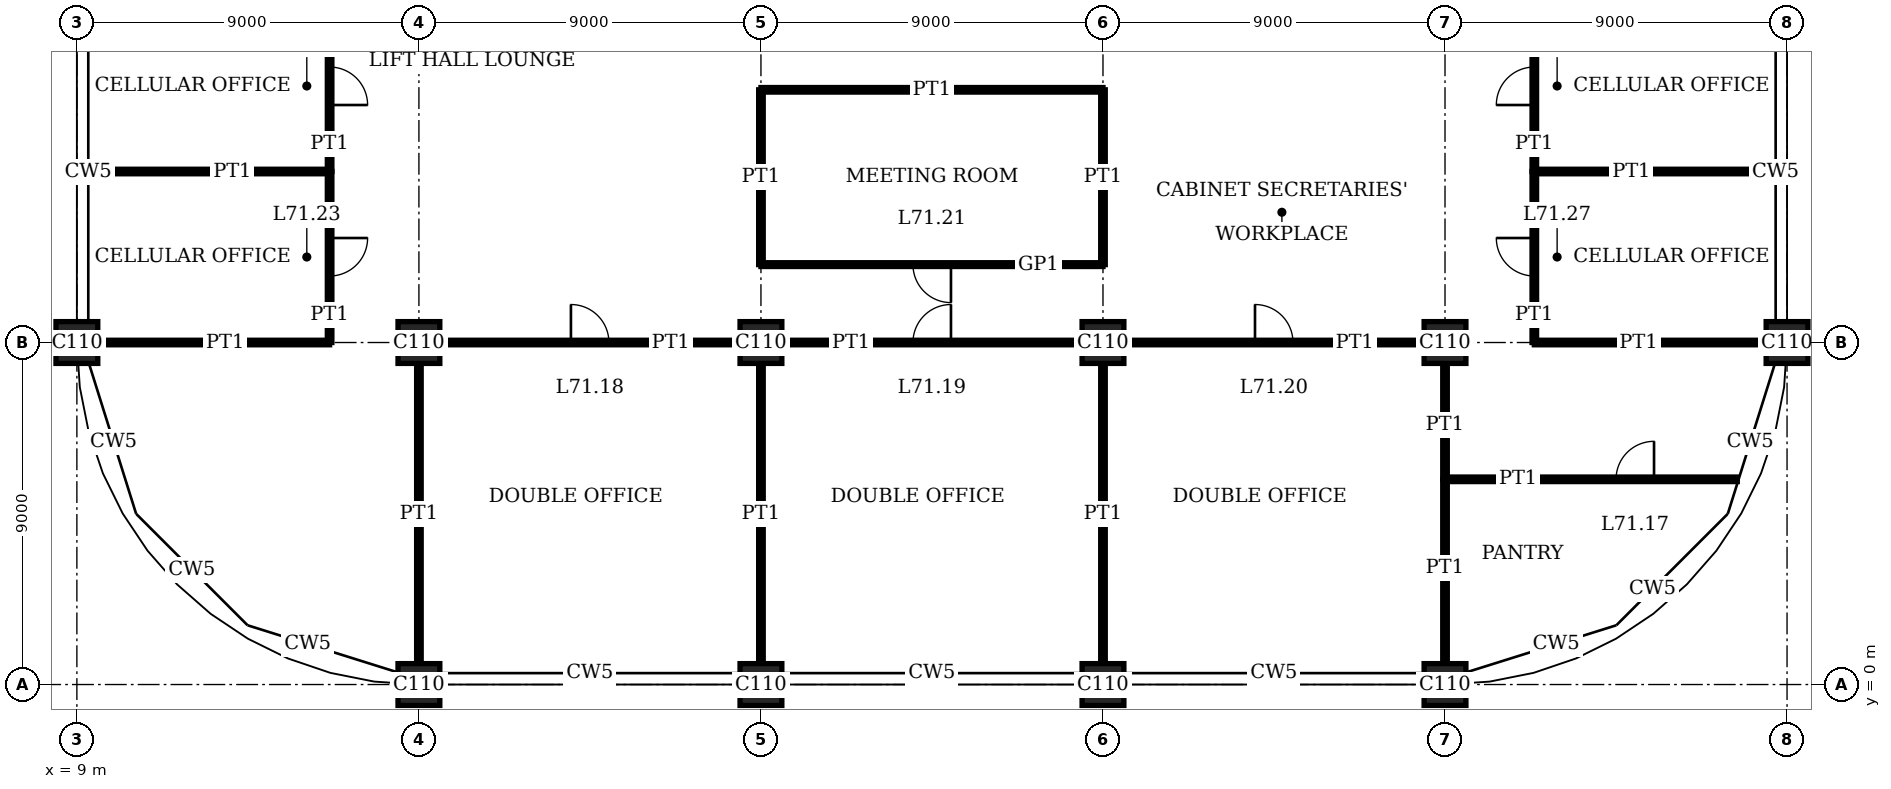
"""IFC4 building model, lengths in metres.
Left out: names, types, materials, properties, quantities, classifications, styles, units other than length and angle.
Written with IfcOpenShell. Run it as: python <this file> out.ifc"""

import sys

from ifc_helpers import new_model, si_unit, direction, frame, frame_2d, origin, origin_2d, place, context, subcontext, project, spatial, rectangle, extrude, element, fill, save


model = new_model("IFC4")
c1 = context("Model", 3, precision=1e-05, world=origin(), true_north=direction((0.0, 1.0)))
c2 = subcontext(c1, "Body", "Model", "MODEL_VIEW")
j1 = project(units=[si_unit("LENGTHUNIT", "METRE"), si_unit("PLANEANGLEUNIT", "RADIAN")], contexts=[c1])
p1 = place(None, origin())
s1 = spatial("IfcSite", under=j1, at=p1, CompositionType="ELEMENT")
p2 = place(p1, origin())
s2 = spatial("IfcBuilding", under=s1, at=p2, CompositionType="ELEMENT")
p3 = place(p2, frame((0.0, 0.0, 291.4)))
s3 = spatial("IfcBuildingStorey", under=s2, at=p3, CompositionType="ELEMENT", Elevation=291.4)
for number, where, z_axis, x_axis in (
    (1, (9.0, 9.0, 0.0), (0.0, 0.0, 1.0), (1.0, 0.0, 0.0)),
    (2, (18.0, 0.0, 0.0), (0.0, 0.0, 1.0), (1.0, 0.0, 0.0)),
    (3, (18.0, 9.0, 0.0), (0.0, 0.0, 1.0), (1.0, 0.0, 0.0)),
    (4, (27.0, 0.0, 0.0), (0.0, 0.0, 1.0), (1.0, 0.0, 0.0)),
    (5, (27.0, 9.0, 0.0), (0.0, 0.0, 1.0), (1.0, 0.0, 0.0)),
    (6, (36.0, 0.0, 0.0), (0.0, 0.0, 1.0), (1.0, 0.0, 0.0)),
    (7, (36.0, 9.0, 0.0), (0.0, 0.0, 1.0), (1.0, 0.0, 0.0)),
    (8, (45.0, 0.0, 0.0), (0.0, 0.0, 1.0), (1.0, 0.0, 0.0)),
    (9, (45.0, 9.0, 0.0), (0.0, 0.0, 1.0), (1.0, 0.0, 0.0)),
    (10, (54.0, 9.0, 0.0), (0.0, 0.0, 1.0), (1.0, 0.0, 0.0)),
):
    element("IfcColumn", number, at=place(p3, frame(where, z_axis=z_axis, x_axis=x_axis)), inside=s3, PredefinedType="COLUMN", context=c2, shape_type="SweptSolid", body=[
        extrude(rectangle(XDim=1.1, YDim=1.1, at=origin_2d()), origin(), (0.0, 0.0, 1.0), 4.0),
    ])
p4 = place(p3, frame((45.0, 5.4, 0.0), z_axis=(0.0, 0.0, 1.0), x_axis=(1.0, 0.0, 0.0)))
e11 = element("IfcWall", 11, at=p4, inside=s3, PredefinedType="PARTITIONING", context=c2, shape_type="SweptSolid", body=[
    extrude(rectangle(XDim=7.69, YDim=0.12, at=frame_2d((3.845, 0.0))), origin(), (0.0, 0.0, 1.0), 3.75),
])
p5 = place(p4, frame((4.5, 0.0, 0.0)))
e12 = element("IfcOpeningElement", 12, at=p5, cuts=e11, PredefinedType="OPENING", context=c2, shape_type="SweptSolid", body=[
    extrude(rectangle(XDim=1.0, YDim=2.4, at=frame_2d((0.5, 1.2))), frame((0.0, 0.07, 0.0), z_axis=(0.0, -1.0, 0.0), x_axis=(1.0, 0.0, 0.0)), (0.0, 0.0, 1.0), 0.14),
])
p6 = place(p3, frame((18.55, 9.0, 0.0), z_axis=(0.0, 0.0, 1.0), x_axis=(1.0, 0.0, 0.0)))
e13 = element("IfcWall", 13, at=p6, inside=s3, PredefinedType="PARTITIONING", context=c2, shape_type="SweptSolid", body=[
    extrude(rectangle(XDim=7.9, YDim=0.12, at=frame_2d((3.95, 0.0))), origin(), (0.0, 0.0, 1.0), 3.05),
])
p7 = place(p6, frame((3.45, 0.0, 0.0)))
e14 = element("IfcOpeningElement", 14, at=p7, cuts=e13, PredefinedType="OPENING", context=c2, shape_type="SweptSolid", body=[
    extrude(rectangle(XDim=1.0, YDim=2.4, at=frame_2d((0.5, 1.2))), frame((0.0, 0.07, 0.0), z_axis=(0.0, -1.0, 0.0), x_axis=(1.0, 0.0, 0.0)), (0.0, 0.0, 1.0), 0.14),
])
p8 = place(p3, frame((27.55, 9.0, 0.0), z_axis=(0.0, 0.0, 1.0), x_axis=(1.0, 0.0, 0.0)))
e15 = element("IfcWall", 15, at=p8, inside=s3, PredefinedType="PARTITIONING", context=c2, shape_type="SweptSolid", body=[
    extrude(rectangle(XDim=7.9, YDim=0.12, at=frame_2d((3.95, 0.0))), origin(), (0.0, 0.0, 1.0), 3.05),
])
p9 = place(p8, frame((3.45, 0.0, 0.0)))
e16 = element("IfcOpeningElement", 16, at=p9, cuts=e15, PredefinedType="OPENING", context=c2, shape_type="SweptSolid", body=[
    extrude(rectangle(XDim=1.0, YDim=2.4, at=frame_2d((0.5, 1.2))), frame((0.0, 0.07, 0.0), z_axis=(0.0, -1.0, 0.0), x_axis=(1.0, 0.0, 0.0)), (0.0, 0.0, 1.0), 0.14),
])
p10 = place(p3, frame((36.55, 9.0, 0.0), z_axis=(0.0, 0.0, 1.0), x_axis=(1.0, 0.0, 0.0)))
e17 = element("IfcWall", 17, at=p10, inside=s3, PredefinedType="PARTITIONING", context=c2, shape_type="SweptSolid", body=[
    extrude(rectangle(XDim=7.9, YDim=0.12, at=frame_2d((3.95, 0.0))), origin(), (0.0, 0.0, 1.0), 3.05),
])
p11 = place(p10, frame((3.45, 0.0, 0.0)))
e18 = element("IfcOpeningElement", 18, at=p11, cuts=e17, PredefinedType="OPENING", context=c2, shape_type="SweptSolid", body=[
    extrude(rectangle(XDim=1.0, YDim=2.4, at=frame_2d((0.5, 1.2))), frame((0.0, 0.07, 0.0), z_axis=(0.0, -1.0, 0.0), x_axis=(1.0, 0.0, 0.0)), (0.0, 0.0, 1.0), 0.14),
])
for number, where, z_axis, x_axis in (
    (19, (47.35, 9.0, 0.0), (0.0, 0.0, 1.0), (1.0, 0.0, 0.0)),
    (20, (9.55, 9.0, 0.0), (0.0, 0.0, 1.0), (1.0, 0.0, 0.0)),
):
    element("IfcWall", number, at=place(p3, frame(where, z_axis=z_axis, x_axis=x_axis)), inside=s3, PredefinedType="PARTITIONING", context=c2, shape_type="SweptSolid", body=[
        extrude(rectangle(XDim=6.1, YDim=0.12, at=frame_2d((3.05, 0.0))), origin(), (0.0, 0.0, 1.0), 3.05),
    ])
p12 = place(p3, frame((27.0, 11.05, 0.0), z_axis=(0.0, 0.0, 1.0), x_axis=(1.0, 0.0, 0.0)))
e21 = element("IfcWall", 21, at=p12, inside=s3, PredefinedType="PARTITIONING", context=c2, shape_type="SweptSolid", body=[
    extrude(rectangle(XDim=9.0, YDim=0.1, at=frame_2d((4.5, 0.0))), origin(), (0.0, 0.0, 1.0), 3.75),
])
p13 = place(p12, frame((4.0, 0.0, 0.0)))
e22 = element("IfcOpeningElement", 22, at=p13, cuts=e21, PredefinedType="OPENING", context=c2, shape_type="SweptSolid", body=[
    extrude(rectangle(XDim=1.0, YDim=2.4, at=frame_2d((0.5, 1.2))), frame((0.0, 0.06, 0.0), z_axis=(0.0, -1.0, 0.0), x_axis=(1.0, 0.0, 0.0)), (0.0, 0.0, 1.0), 0.12),
])
for number, where, z_axis, x_axis in (
    (23, (47.35, 13.5, 0.0), (0.0, 0.0, 1.0), (1.0, 0.0, 0.0)),
    (24, (9.31, 13.5, 0.0), (0.0, 0.0, 1.0), (1.0, 0.0, 0.0)),
):
    element("IfcWall", number, at=place(p3, frame(where, z_axis=z_axis, x_axis=x_axis)), inside=s3, PredefinedType="PARTITIONING", context=c2, shape_type="SweptSolid", body=[
        extrude(rectangle(XDim=6.34, YDim=0.12, at=frame_2d((3.17, 0.0))), origin(), (0.0, 0.0, 1.0), 3.1),
    ])
p14 = place(p3, frame((27.0, 15.65, 0.0), z_axis=(0.0, 0.0, 1.0), x_axis=(1.0, 0.0, 0.0)))
e25 = element("IfcWall", 25, at=p14, inside=s3, PredefinedType="PARTITIONING", context=c2, shape_type="SweptSolid", body=[
    extrude(rectangle(XDim=9.0, YDim=0.12, at=frame_2d((4.5, 0.0))), origin(), (0.0, 0.0, 1.0), 3.75),
])
p15 = place(p3, frame((15.65, 9.0, 0.0), z_axis=(0.0, 0.0, 1.0), x_axis=(0.0, 1.0, 0.0)))
e26 = element("IfcWall", 26, at=p15, inside=s3, PredefinedType="PARTITIONING", context=c2, shape_type="SweptSolid", body=[
    extrude(rectangle(XDim=4.5, YDim=0.12, at=frame_2d((2.25, 0.0))), origin(), (0.0, 0.0, 1.0), 3.75),
])
p16 = place(p15, frame((1.75, 0.0, 0.0)))
e27 = element("IfcOpeningElement", 27, at=p16, cuts=e26, PredefinedType="OPENING", context=c2, shape_type="SweptSolid", body=[
    extrude(rectangle(XDim=1.0, YDim=2.4, at=frame_2d((0.5, 1.2))), frame((0.0, 0.07, 0.0), z_axis=(0.0, -1.0, 0.0), x_axis=(1.0, 0.0, 0.0)), (0.0, 0.0, 1.0), 0.14),
])
p17 = place(p3, frame((15.65, 13.5, 0.0), z_axis=(0.0, 0.0, 1.0), x_axis=(0.0, 1.0, 0.0)))
e28 = element("IfcWall", 28, at=p17, inside=s3, PredefinedType="PARTITIONING", context=c2, shape_type="SweptSolid", body=[
    extrude(rectangle(XDim=4.5, YDim=0.12, at=frame_2d((2.25, 0.0))), origin(), (0.0, 0.0, 1.0), 3.75),
])
p18 = place(p17, frame((1.75, 0.0, 0.0)))
e29 = element("IfcOpeningElement", 29, at=p18, cuts=e28, PredefinedType="OPENING", context=c2, shape_type="SweptSolid", body=[
    extrude(rectangle(XDim=1.0, YDim=2.4, at=frame_2d((0.5, 1.2))), frame((0.0, 0.07, 0.0), z_axis=(0.0, -1.0, 0.0), x_axis=(1.0, 0.0, 0.0)), (0.0, 0.0, 1.0), 0.14),
])
for number, where, z_axis, x_axis in (
    (30, (18.0, 0.55, 0.0), (0.0, 0.0, 1.0), (0.0, 1.0, 0.0)),
    (31, (27.0, 0.55, 0.0), (0.0, 0.0, 1.0), (0.0, 1.0, 0.0)),
):
    element("IfcWall", number, at=place(p3, frame(where, z_axis=z_axis, x_axis=x_axis)), inside=s3, PredefinedType="PARTITIONING", context=c2, shape_type="SweptSolid", body=[
        extrude(rectangle(XDim=7.9, YDim=0.12, at=frame_2d((3.95, 0.0))), origin(), (0.0, 0.0, 1.0), 3.05),
    ])
p19 = place(p3, frame((27.0, 11.05, 0.0), z_axis=(0.0, 0.0, 1.0), x_axis=(0.0, 1.0, 0.0)))
e32 = element("IfcWall", 32, at=p19, inside=s3, PredefinedType="PARTITIONING", context=c2, shape_type="SweptSolid", body=[
    extrude(rectangle(XDim=4.6, YDim=0.12, at=frame_2d((2.3, 0.0))), origin(), (0.0, 0.0, 1.0), 3.05),
])
p20 = place(p3, frame((36.0, 0.55, 0.0), z_axis=(0.0, 0.0, 1.0), x_axis=(0.0, 1.0, 0.0)))
e33 = element("IfcWall", 33, at=p20, inside=s3, PredefinedType="PARTITIONING", context=c2, shape_type="SweptSolid", body=[
    extrude(rectangle(XDim=7.9, YDim=0.12, at=frame_2d((3.95, 0.0))), origin(), (0.0, 0.0, 1.0), 3.05),
])
p21 = place(p3, frame((36.0, 11.05, 0.0), z_axis=(0.0, 0.0, 1.0), x_axis=(0.0, 1.0, 0.0)))
e34 = element("IfcWall", 34, at=p21, inside=s3, PredefinedType="PARTITIONING", context=c2, shape_type="SweptSolid", body=[
    extrude(rectangle(XDim=4.6, YDim=0.12, at=frame_2d((2.3, 0.0))), origin(), (0.0, 0.0, 1.0), 3.05),
])
p22 = place(p3, frame((45.0, 0.55, 0.0), z_axis=(0.0, 0.0, 1.0), x_axis=(0.0, 1.0, 0.0)))
e35 = element("IfcWall", 35, at=p22, inside=s3, PredefinedType="PARTITIONING", context=c2, shape_type="SweptSolid", body=[
    extrude(rectangle(XDim=4.85, YDim=0.12, at=frame_2d((2.425, 0.0))), origin(), (0.0, 0.0, 1.0), 3.05),
])
p23 = place(p3, frame((45.0, 5.4, 0.0), z_axis=(0.0, 0.0, 1.0), x_axis=(0.0, 1.0, 0.0)))
e36 = element("IfcWall", 36, at=p23, inside=s3, PredefinedType="PARTITIONING", context=c2, shape_type="SweptSolid", body=[
    extrude(rectangle(XDim=3.05, YDim=0.12, at=frame_2d((1.525, 0.0))), origin(), (0.0, 0.0, 1.0), 3.05),
])
p24 = place(p3, frame((47.35, 9.0, 0.0), z_axis=(0.0, 0.0, 1.0), x_axis=(0.0, 1.0, 0.0)))
e37 = element("IfcWall", 37, at=p24, inside=s3, PredefinedType="PARTITIONING", context=c2, shape_type="SweptSolid", body=[
    extrude(rectangle(XDim=4.5, YDim=0.12, at=frame_2d((2.25, 0.0))), origin(), (0.0, 0.0, 1.0), 3.75),
])
p25 = place(p24, frame((1.75, 0.0, 0.0)))
e38 = element("IfcOpeningElement", 38, at=p25, cuts=e37, PredefinedType="OPENING", context=c2, shape_type="SweptSolid", body=[
    extrude(rectangle(XDim=1.0, YDim=2.4, at=frame_2d((0.5, 1.2))), frame((0.0, 0.07, 0.0), z_axis=(0.0, -1.0, 0.0), x_axis=(1.0, 0.0, 0.0)), (0.0, 0.0, 1.0), 0.14),
])
p26 = place(p3, frame((47.35, 13.5, 0.0), z_axis=(0.0, 0.0, 1.0), x_axis=(0.0, 1.0, 0.0)))
e39 = element("IfcWall", 39, at=p26, inside=s3, PredefinedType="PARTITIONING", context=c2, shape_type="SweptSolid", body=[
    extrude(rectangle(XDim=4.5, YDim=0.12, at=frame_2d((2.25, 0.0))), origin(), (0.0, 0.0, 1.0), 3.75),
])
p27 = place(p26, frame((1.75, 0.0, 0.0)))
e40 = element("IfcOpeningElement", 40, at=p27, cuts=e39, PredefinedType="OPENING", context=c2, shape_type="SweptSolid", body=[
    extrude(rectangle(XDim=1.0, YDim=2.4, at=frame_2d((0.5, 1.2))), frame((0.0, 0.07, 0.0), z_axis=(0.0, -1.0, 0.0), x_axis=(1.0, 0.0, 0.0)), (0.0, 0.0, 1.0), 0.14),
])
p28 = place(p5, origin())
e41 = element("IfcDoor", 41, at=p28, inside=s3, OperationType="SINGLE_SWING_LEFT", PredefinedType="DOOR", context=c2, shape_type="SweptSolid", body=[
    extrude(rectangle(XDim=1.0, YDim=2.4, at=frame_2d((0.5, 1.2))), frame((0.0, 0.025, 0.0), z_axis=(0.0, -1.0, 0.0), x_axis=(1.0, 0.0, 0.0)), (0.0, 0.0, 1.0), 0.05),
])
fill(e12, e41)
p29 = place(p7, origin())
e42 = element("IfcDoor", 42, at=p29, inside=s3, OperationType="SINGLE_SWING_RIGHT", PredefinedType="DOOR", context=c2, shape_type="SweptSolid", body=[
    extrude(rectangle(XDim=1.0, YDim=2.4, at=frame_2d((0.5, 1.2))), frame((0.0, 0.025, 0.0), z_axis=(0.0, -1.0, 0.0), x_axis=(1.0, 0.0, 0.0)), (0.0, 0.0, 1.0), 0.05),
])
fill(e14, e42)
p30 = place(p9, origin())
e43 = element("IfcDoor", 43, at=p30, inside=s3, OperationType="SINGLE_SWING_LEFT", PredefinedType="DOOR", context=c2, shape_type="SweptSolid", body=[
    extrude(rectangle(XDim=1.0, YDim=2.4, at=frame_2d((0.5, 1.2))), frame((0.0, 0.025, 0.0), z_axis=(0.0, -1.0, 0.0), x_axis=(1.0, 0.0, 0.0)), (0.0, 0.0, 1.0), 0.05),
])
fill(e16, e43)
p31 = place(p11, origin())
e44 = element("IfcDoor", 44, at=p31, inside=s3, OperationType="SINGLE_SWING_RIGHT", PredefinedType="DOOR", context=c2, shape_type="SweptSolid", body=[
    extrude(rectangle(XDim=1.0, YDim=2.4, at=frame_2d((0.5, 1.2))), frame((0.0, 0.025, 0.0), z_axis=(0.0, -1.0, 0.0), x_axis=(1.0, 0.0, 0.0)), (0.0, 0.0, 1.0), 0.05),
])
fill(e18, e44)
p32 = place(p13, origin())
e45 = element("IfcDoor", 45, at=p32, inside=s3, OperationType="SINGLE_SWING_RIGHT", PredefinedType="DOOR", context=c2, shape_type="SweptSolid", body=[
    extrude(rectangle(XDim=1.0, YDim=2.4, at=frame_2d((0.5, 1.2))), frame((0.0, 0.02, 0.0), z_axis=(0.0, -1.0, 0.0), x_axis=(1.0, 0.0, 0.0)), (0.0, 0.0, 1.0), 0.04),
])
fill(e22, e45)
p33 = place(p16, origin())
e46 = element("IfcDoor", 46, at=p33, inside=s3, OperationType="SINGLE_SWING_RIGHT", PredefinedType="DOOR", context=c2, shape_type="SweptSolid", body=[
    extrude(rectangle(XDim=1.0, YDim=2.4, at=frame_2d((0.5, 1.2))), frame((0.0, 0.025, 0.0), z_axis=(0.0, -1.0, 0.0), x_axis=(1.0, 0.0, 0.0)), (0.0, 0.0, 1.0), 0.05),
])
fill(e27, e46)
p34 = place(p18, origin())
e47 = element("IfcDoor", 47, at=p34, inside=s3, OperationType="SINGLE_SWING_LEFT", PredefinedType="DOOR", context=c2, shape_type="SweptSolid", body=[
    extrude(rectangle(XDim=1.0, YDim=2.4, at=frame_2d((0.5, 1.2))), frame((0.0, 0.025, 0.0), z_axis=(0.0, -1.0, 0.0), x_axis=(1.0, 0.0, 0.0)), (0.0, 0.0, 1.0), 0.05),
])
fill(e29, e47)
p35 = place(p25, origin())
e48 = element("IfcDoor", 48, at=p35, inside=s3, OperationType="SINGLE_SWING_LEFT", PredefinedType="DOOR", context=c2, shape_type="SweptSolid", body=[
    extrude(rectangle(XDim=1.0, YDim=2.4, at=frame_2d((0.5, 1.2))), frame((0.0, 0.025, 0.0), z_axis=(0.0, -1.0, 0.0), x_axis=(1.0, 0.0, 0.0)), (0.0, 0.0, 1.0), 0.05),
])
fill(e38, e48)
p36 = place(p27, origin())
e49 = element("IfcDoor", 49, at=p36, inside=s3, OperationType="SINGLE_SWING_RIGHT", PredefinedType="DOOR", context=c2, shape_type="SweptSolid", body=[
    extrude(rectangle(XDim=1.0, YDim=2.4, at=frame_2d((0.5, 1.2))), frame((0.0, 0.025, 0.0), z_axis=(0.0, -1.0, 0.0), x_axis=(1.0, 0.0, 0.0)), (0.0, 0.0, 1.0), 0.05),
])
fill(e40, e49)
save(model, sys.argv[1])
